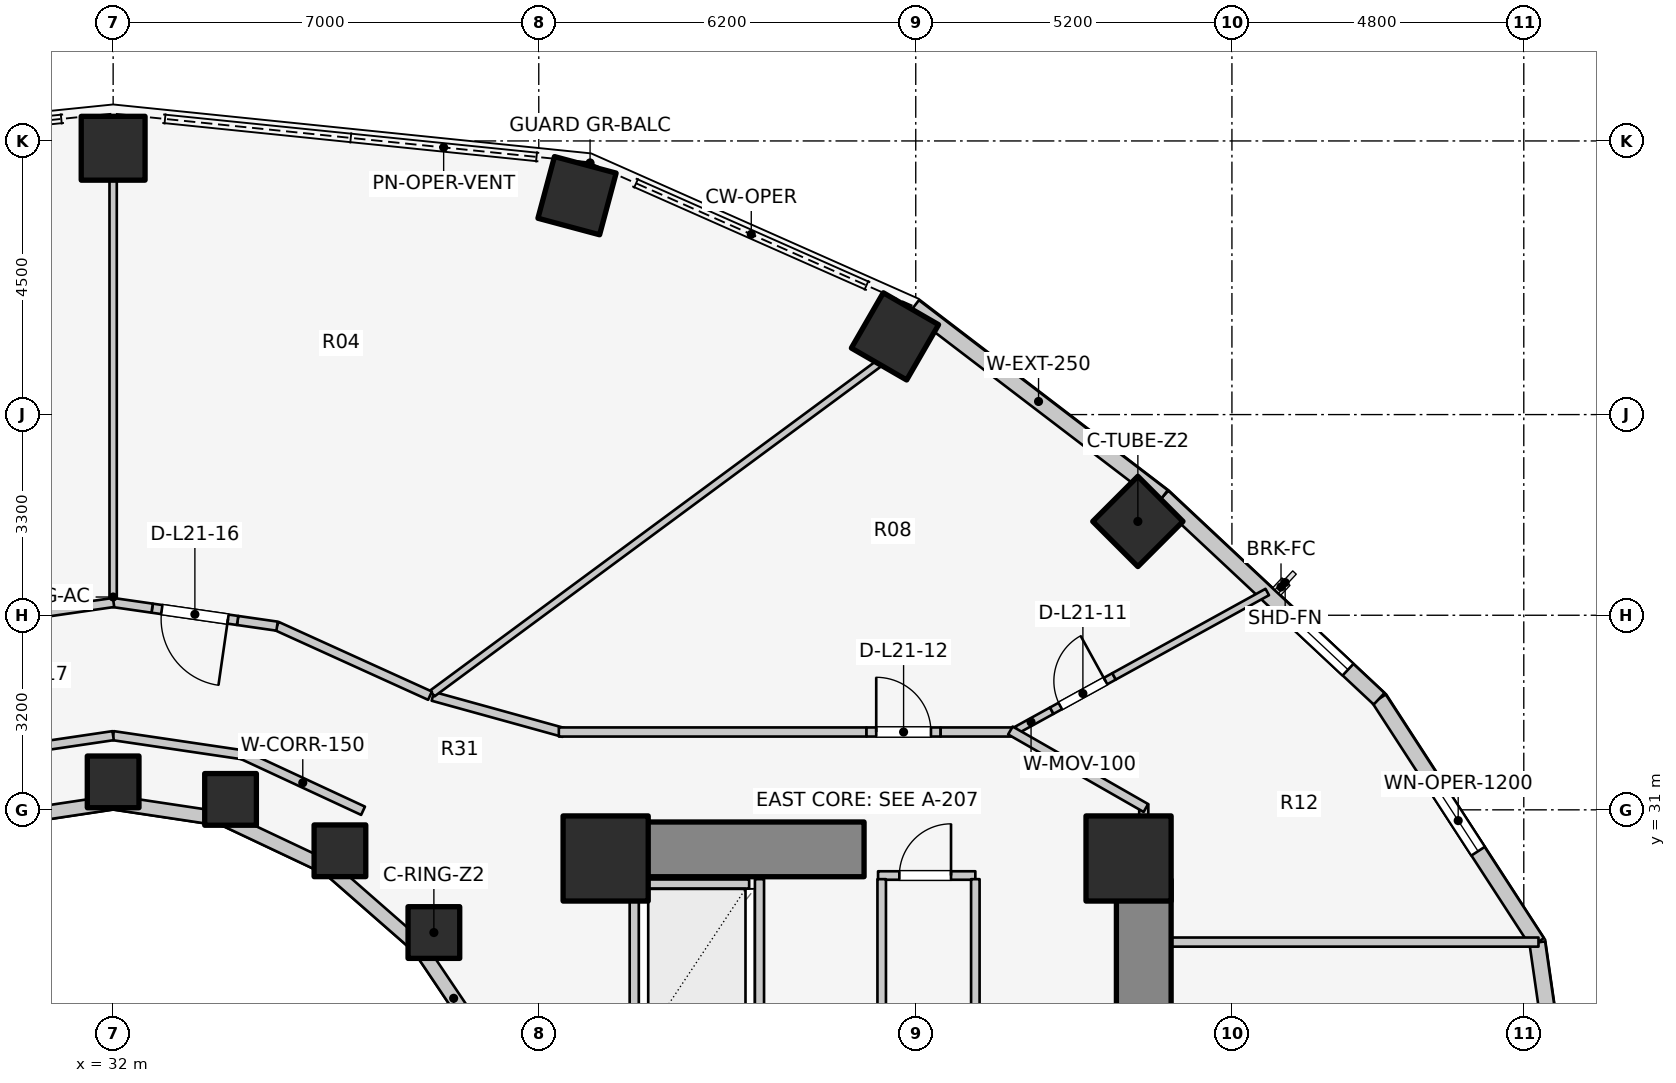
"""IFC4 building model, lengths in metres.
Left out: names, types, materials, properties, quantities, classifications, styles, units other than length and angle.
Written with IfcOpenShell. Run it as: python <this file> out.ifc"""

import sys

from ifc_helpers import new_model, si_unit, direction, frame, frame_2d, origin, origin_2d, place, context, subcontext, project, spatial, rectangle, extrude, element, fill, save


model = new_model("IFC4")
c1 = context("Model", 3, precision=1e-05, world=origin(), true_north=direction((0.0, 1.0)))
c2 = subcontext(c1, "Body", "Model", "MODEL_VIEW")
j1 = project(units=[si_unit("LENGTHUNIT", "METRE"), si_unit("PLANEANGLEUNIT", "RADIAN")], contexts=[c1])
p1 = place(None, origin())
s1 = spatial("IfcSite", under=j1, at=p1, CompositionType="ELEMENT")
p2 = place(p1, origin())
s2 = spatial("IfcBuilding", under=s1, at=p2, CompositionType="ELEMENT")
p3 = place(p2, frame((0.0, 0.0, 73.2)))
s3 = spatial("IfcBuildingStorey", under=s2, at=p3, CompositionType="ELEMENT", Elevation=73.2)
p4 = place(p3, frame((48.95, 17.05, 0.0), z_axis=(0.0, 0.0, 1.0), x_axis=(0.0, 1.0, 0.0)))
e1 = element("IfcWall", 1, at=p4, inside=s3, PredefinedType="SHEAR", context=c2, shape_type="SweptSolid", body=[
    extrude(rectangle(XDim=12.8, YDim=0.9, at=frame_2d((6.4, 0.0))), origin(), (0.0, 0.0, 1.0), 3.1),
])
p5 = place(p3, frame((39.85, 30.35, 0.0), z_axis=(0.0, 0.0, 1.0), x_axis=(1.0, 0.0, 0.0)))
e2 = element("IfcWall", 2, at=p5, inside=s3, PredefinedType="SHEAR", context=c2, shape_type="SweptSolid", body=[
    extrude(rectangle(XDim=4.5, YDim=0.9, at=frame_2d((2.25, 0.0))), origin(), (0.0, 0.0, 1.0), 3.1),
])
for number, where, z_axis, x_axis in (
    (3, (48.7, 30.2, 0.0), (0.0, 0.0, 1.0), (1.0, 0.0, 0.0)),
    (4, (40.1, 30.2, 0.0), (0.0, 0.0, 1.0), (1.0, 0.0, 0.0)),
):
    element("IfcColumn", number, at=place(p3, frame(where, z_axis=z_axis, x_axis=x_axis)), inside=s3, PredefinedType="COLUMN", context=c2, shape_type="SweptSolid", body=[
        extrude(rectangle(XDim=1.4, YDim=1.4, at=origin_2d()), origin(), (0.0, 0.0, 1.0), 3.1),
    ])
p6 = place(p3, frame((37.275, 28.982, 0.0), z_axis=(0.0, 0.0, 1.0), x_axis=(1.0, 0.0, 0.0)))
e5 = element("IfcColumn", 5, at=p6, inside=s3, PredefinedType="COLUMN", context=c2, shape_type="SweptSolid", body=[
    extrude(rectangle(XDim=0.85, YDim=0.85, at=origin_2d()), origin(), (0.0, 0.0, 1.0), 3.1),
])
p7 = place(p3, frame((48.853, 35.743, 0.0), z_axis=(0.0, 0.0, 1.0), x_axis=(0.707106781187, 0.707106781187, 0.0)))
e6 = element("IfcColumn", 6, at=p7, inside=s3, PredefinedType="COLUMN", context=c2, shape_type="SweptSolid", body=[
    extrude(rectangle(XDim=1.05, YDim=1.05, at=origin_2d()), origin(), (0.0, 0.0, 1.0), 3.1),
])
p8 = place(p3, frame((35.73, 30.327, 0.0), z_axis=(0.0, 0.0, 1.0), x_axis=(1.0, 0.0, 0.0)))
e7 = element("IfcColumn", 7, at=p8, inside=s3, PredefinedType="COLUMN", context=c2, shape_type="SweptSolid", body=[
    extrude(rectangle(XDim=0.85, YDim=0.85, at=origin_2d()), origin(), (0.0, 0.0, 1.0), 3.1),
])
p9 = place(p3, frame((44.858, 38.786, 0.0), z_axis=(0.0, 0.0, 1.0), x_axis=(0.5, 0.866025403784, 0.0)))
e8 = element("IfcColumn", 8, at=p9, inside=s3, PredefinedType="COLUMN", context=c2, shape_type="SweptSolid", body=[
    extrude(rectangle(XDim=1.05, YDim=1.05, at=origin_2d()), origin(), (0.0, 0.0, 1.0), 3.1),
])
p10 = place(p3, frame((33.931, 31.172, 0.0), z_axis=(0.0, 0.0, 1.0), x_axis=(1.0, 0.0, 0.0)))
e9 = element("IfcColumn", 9, at=p10, inside=s3, PredefinedType="COLUMN", context=c2, shape_type="SweptSolid", body=[
    extrude(rectangle(XDim=0.85, YDim=0.85, at=origin_2d()), origin(), (0.0, 0.0, 1.0), 3.1),
])
p11 = place(p3, frame((39.629, 41.1, 0.0), z_axis=(0.0, 0.0, 1.0), x_axis=(0.258819045103, 0.965925826289, 0.0)))
e10 = element("IfcColumn", 10, at=p11, inside=s3, PredefinedType="COLUMN", context=c2, shape_type="SweptSolid", body=[
    extrude(rectangle(XDim=1.05, YDim=1.05, at=origin_2d()), origin(), (0.0, 0.0, 1.0), 3.1),
])
p12 = place(p3, frame((32.0, 31.46, 0.0), z_axis=(0.0, 0.0, 1.0), x_axis=(1.0, 0.0, 0.0)))
e11 = element("IfcColumn", 11, at=p12, inside=s3, PredefinedType="COLUMN", context=c2, shape_type="SweptSolid", body=[
    extrude(rectangle(XDim=0.85, YDim=0.85, at=origin_2d()), origin(), (0.0, 0.0, 1.0), 3.1),
])
p13 = place(p3, frame((32.0, 41.88, 0.0), z_axis=(0.0, 0.0, 1.0), x_axis=(0.0, 1.0, 0.0)))
e12 = element("IfcColumn", 12, at=p13, inside=s3, PredefinedType="COLUMN", context=c2, shape_type="SweptSolid", body=[
    extrude(rectangle(XDim=1.05, YDim=1.05, at=origin_2d()), origin(), (0.0, 0.0, 1.0), 3.1),
])
p14 = place(p3, frame((38.166, 27.06, 0.0), z_axis=(0.0, 0.0, 1.0), x_axis=(-0.558197800898, 0.829707909492, 0.0)))
e13 = element("IfcWall", 13, at=p14, inside=s3, PredefinedType="STANDARD", context=c2, shape_type="SweptSolid", body=[
    extrude(rectangle(XDim=2.027, YDim=0.23, at=frame_2d((1.013, 0.0))), origin(), (0.0, 0.0, 1.0), 1.22),
])
p15 = place(p3, frame((37.035, 28.742, 0.0), z_axis=(0.0, 0.0, 1.0), x_axis=(-0.752576694707, 0.658504607869, 0.0)))
e14 = element("IfcWall", 14, at=p15, inside=s3, PredefinedType="STANDARD", context=c2, shape_type="SweptSolid", body=[
    extrude(rectangle(XDim=1.959, YDim=0.23, at=frame_2d((0.98, 0.0))), origin(), (0.0, 0.0, 1.0), 1.22),
])
p16 = place(p3, frame((35.56, 30.032, 0.0), z_axis=(0.0, 0.0, 1.0), x_axis=(-0.904179699603, 0.427152280606, 0.0)))
e15 = element("IfcWall", 15, at=p16, inside=s3, PredefinedType="STANDARD", context=c2, shape_type="SweptSolid", body=[
    extrude(rectangle(XDim=1.899, YDim=0.23, at=frame_2d((0.95, 0.0))), origin(), (0.0, 0.0, 1.0), 1.22),
])
for number, where, z_axis, x_axis in (
    (16, (33.843, 30.843, 0.0), (0.0, 0.0, 1.0), (-0.989, 0.149, 0.0)),
    (17, (32.0, 31.12, 0.0), (0.0, 0.0, 1.0), (-0.989, -0.149, 0.0)),
):
    element("IfcWall", number, at=place(p3, frame(where, z_axis=z_axis, x_axis=x_axis)), inside=s3, PredefinedType="STANDARD", context=c2, shape_type="SweptSolid", body=[
        extrude(rectangle(XDim=1.864, YDim=0.23, at=frame_2d((0.932, 0.0))), origin(), (0.0, 0.0, 1.0), 1.22),
    ])
p17 = place(p3, frame((56.26, 23.0, 0.0), z_axis=(0.0, 0.0, 1.0), x_axis=(-0.142572472068, 0.98978436551, 0.0)))
e18 = element("IfcWall", 18, at=p17, inside=s3, PredefinedType="STANDARD", context=c2, shape_type="SweptSolid", body=[
    extrude(rectangle(XDim=5.879, YDim=0.26, at=frame_2d((2.939, 0.0))), origin(), (0.0, 0.0, 1.0), 2.57),
])
p18 = place(p17, frame((2.189, 0.0, 0.75)))
e19 = element("IfcOpeningElement", 19, at=p18, cuts=e18, PredefinedType="OPENING", context=c2, shape_type="SweptSolid", body=[
    extrude(rectangle(XDim=1.5, YDim=1.6, at=frame_2d((0.75, 0.8))), frame((0.0, 0.14, 0.0), z_axis=(0.0, -1.0, 0.0), x_axis=(1.0, 0.0, 0.0)), (0.0, 0.0, 1.0), 0.28),
])
p19 = place(p3, frame((55.422, 28.819, 0.0), z_axis=(0.0, 0.0, 1.0), x_axis=(-0.544388392991, 0.838833283541, 0.0)))
e20 = element("IfcWall", 20, at=p19, inside=s3, PredefinedType="STANDARD", context=c2, shape_type="SweptSolid", body=[
    extrude(rectangle(XDim=4.778, YDim=0.26, at=frame_2d((2.389, 0.0))), origin(), (0.0, 0.0, 1.0), 1.22),
])
p20 = place(p19, frame((1.789, 0.0, 0.15)))
e21 = element("IfcOpeningElement", 21, at=p20, cuts=e20, PredefinedType="OPENING", context=c2, shape_type="SweptSolid", body=[
    extrude(rectangle(XDim=1.2, YDim=0.9, at=frame_2d((0.6, 0.45))), frame((0.0, 0.14, 0.0), z_axis=(0.0, -1.0, 0.0), x_axis=(1.0, 0.0, 0.0)), (0.0, 0.0, 1.0), 0.28),
])
p21 = place(p3, frame((52.821, 32.827, 0.0), z_axis=(0.0, 0.0, 1.0), x_axis=(-0.730162452258, 0.68327358599, 0.0)))
e22 = element("IfcWall", 22, at=p21, inside=s3, PredefinedType="STANDARD", context=c2, shape_type="SweptSolid", body=[
    extrude(rectangle(XDim=4.868, YDim=0.26, at=frame_2d((2.434, 0.0))), origin(), (0.0, 0.0, 1.0), 1.22),
])
p22 = place(p21, frame((0.7, 0.0, 0.15)))
e23 = element("IfcOpeningElement", 23, at=p22, cuts=e22, PredefinedType="OPENING", context=c2, shape_type="SweptSolid", body=[
    extrude(rectangle(XDim=1.2, YDim=0.9, at=frame_2d((0.6, 0.45))), frame((0.0, 0.14, 0.0), z_axis=(0.0, -1.0, 0.0), x_axis=(1.0, 0.0, 0.0)), (0.0, 0.0, 1.0), 0.28),
])
p23 = place(p3, frame((49.266, 36.153, 0.0), z_axis=(0.0, 0.0, 1.0), x_axis=(-0.794809810864, 0.606858603427, 0.0)))
e24 = element("IfcWall", 24, at=p23, inside=s3, PredefinedType="STANDARD", context=c2, shape_type="SweptSolid", body=[
    extrude(rectangle(XDim=5.149, YDim=0.26, at=frame_2d((2.575, 0.0))), origin(), (0.0, 0.0, 1.0), 1.22),
])
p24 = place(p3, frame((40.74, 29.78, 0.0), z_axis=(0.0, 0.0, 1.0), x_axis=(1.0, 0.0, 0.0)))
e25 = element("IfcWall", 25, at=p24, inside=s3, PredefinedType="SOLIDWALL", context=c2, shape_type="SweptSolid", body=[
    extrude(rectangle(XDim=1.72, YDim=0.15, at=frame_2d((0.86, 0.0))), origin(), (0.0, 0.0, 1.0), 2.575),
])
for number, where, z_axis, x_axis in (
    (26, (40.57, 27.14, 0.0), (0.0, 0.0, 1.0), (0.0, 1.0, 0.0)),
    (27, (42.63, 27.14, 0.0), (0.0, 0.0, 1.0), (0.0, 1.0, 0.0)),
):
    element("IfcWall", number, at=place(p3, frame(where, z_axis=z_axis, x_axis=x_axis)), inside=s3, PredefinedType="SOLIDWALL", context=c2, shape_type="SweptSolid", body=[
        extrude(rectangle(XDim=2.72, YDim=0.15, at=frame_2d((1.36, 0.0))), origin(), (0.0, 0.0, 1.0), 2.575),
    ])
p25 = place(p3, frame((44.58, 29.92, 0.0), z_axis=(0.0, 0.0, 1.0), x_axis=(1.0, 0.0, 0.0)))
e28 = element("IfcWall", 28, at=p25, inside=s3, PredefinedType="PLUMBINGWALL", context=c2, shape_type="SweptSolid", body=[
    extrude(rectangle(XDim=1.6, YDim=0.14, at=frame_2d((0.8, 0.0))), origin(), (0.0, 0.0, 1.0), 2.575),
])
p26 = place(p25, frame((0.35, 0.0, 0.0)))
e29 = element("IfcOpeningElement", 29, at=p26, cuts=e28, PredefinedType="OPENING", context=c2, shape_type="SweptSolid", body=[
    extrude(rectangle(XDim=0.85, YDim=2.05, at=frame_2d((0.425, 1.025))), frame((0.0, 0.08, 0.0), z_axis=(0.0, -1.0, 0.0), x_axis=(1.0, 0.0, 0.0)), (0.0, 0.0, 1.0), 0.16),
])
for number, where, z_axis, x_axis in (
    (30, (44.64, 25.98, 0.0), (0.0, 0.0, 1.0), (0.0, 1.0, 0.0)),
    (31, (46.18, 25.98, 0.0), (0.0, 0.0, 1.0), (0.0, 1.0, 0.0)),
):
    element("IfcWall", number, at=place(p3, frame(where, z_axis=z_axis, x_axis=x_axis)), inside=s3, PredefinedType="PLUMBINGWALL", context=c2, shape_type="SweptSolid", body=[
        extrude(rectangle(XDim=3.88, YDim=0.14, at=frame_2d((1.94, 0.0))), origin(), (0.0, 0.0, 1.0), 2.575),
    ])
p27 = place(p3, frame((36.11, 30.985, 0.0), z_axis=(0.0, 0.0, 1.0), x_axis=(-0.906943449489, 0.421252393975, 0.0)))
e32 = element("IfcWall", 32, at=p27, inside=s3, PredefinedType="PARTITIONING", context=c2, shape_type="SweptSolid", body=[
    extrude(rectangle(XDim=2.186, YDim=0.15, at=frame_2d((1.093, 0.0))), origin(), (0.0, 0.0, 1.0), 1.992),
])
for number, where, z_axis, x_axis in (
    (33, (34.127, 31.906, 0.0), (0.0, 0.0, 1.0), (-0.989, 0.146, 0.0)),
    (34, (32.0, 32.22, 0.0), (0.0, 0.0, 1.0), (-0.989, -0.146, 0.0)),
):
    element("IfcWall", number, at=place(p3, frame(where, z_axis=z_axis, x_axis=x_axis)), inside=s3, PredefinedType="PARTITIONING", context=c2, shape_type="SweptSolid", body=[
        extrude(rectangle(XDim=2.151, YDim=0.15, at=frame_2d((1.075, 0.0))), origin(), (0.0, 0.0, 1.0), 1.992),
    ])
p28 = place(p3, frame((48.95, 28.825, 0.0), z_axis=(0.0, 0.0, 1.0), x_axis=(1.0, 0.0, 0.0)))
e35 = element("IfcWall", 35, at=p28, inside=s3, PredefinedType="PARTITIONING", context=c2, shape_type="SweptSolid", body=[
    extrude(rectangle(XDim=6.492, YDim=0.15, at=frame_2d((3.246, 0.0))), origin(), (0.0, 0.0, 1.0), 2.575),
])
p29 = place(p3, frame((48.95, 29.8, 0.0), z_axis=(0.0, 0.0, 1.0), x_axis=(0.0, 1.0, 0.0)))
e36 = element("IfcWall", 36, at=p29, inside=s3, PredefinedType="PARTITIONING", context=c2, shape_type="SweptSolid", body=[
    extrude(rectangle(XDim=1.29, YDim=0.15, at=frame_2d((0.645, 0.0))), origin(), (0.0, 0.0, 1.0), 1.22),
])
p30 = place(p3, frame((46.756, 32.256, 0.0), z_axis=(0.0, 0.0, 1.0), x_axis=(0.875930419429, 0.482437457418, 0.0)))
e37 = element("IfcWall", 37, at=p30, inside=s3, PredefinedType="MOVABLE", context=c2, shape_type="SweptSolid", body=[
    extrude(rectangle(XDim=0.777, YDim=0.12, at=frame_2d((0.388, 0.0))), origin(), (0.0, 0.0, 1.0), 2.575),
])
p31 = place(p3, frame((47.437, 32.631, 0.0), z_axis=(0.0, 0.0, 1.0), x_axis=(0.876030797447, 0.482255162673, 0.0)))
e38 = element("IfcWall", 38, at=p31, inside=s3, PredefinedType="MOVABLE", context=c2, shape_type="SweptSolid", body=[
    extrude(rectangle(XDim=1.17, YDim=0.12, at=frame_2d((0.585, 0.0))), origin(), (0.0, 0.0, 1.0), 2.11),
])
p32 = place(p31, frame((0.16, 0.0, 0.0)))
e39 = element("IfcOpeningElement", 39, at=p32, cuts=e38, PredefinedType="OPENING", context=c2, shape_type="SweptSolid", body=[
    extrude(rectangle(XDim=0.85, YDim=2.05, at=frame_2d((0.425, 1.025))), frame((0.0, 0.07, 0.0), z_axis=(0.0, -1.0, 0.0), x_axis=(1.0, 0.0, 0.0)), (0.0, 0.0, 1.0), 0.14),
])
p33 = place(p3, frame((48.461, 33.195, 0.0), z_axis=(0.0, 0.0, 1.0), x_axis=(0.876000760759, 0.482309721185, 0.0)))
e40 = element("IfcWall", 40, at=p33, inside=s3, PredefinedType="MOVABLE", context=c2, shape_type="SweptSolid", body=[
    extrude(rectangle(XDim=2.876, YDim=0.12, at=frame_2d((1.438, 0.0))), origin(), (0.0, 0.0, 1.0), 1.22),
])
p34 = place(p3, frame((37.258, 32.867, 0.0), z_axis=(0.0, 0.0, 1.0), x_axis=(0.963833843713, -0.266503886865, 0.0)))
e41 = element("IfcWall", 41, at=p34, inside=s3, PredefinedType="PARTITIONING", context=c2, shape_type="SweptSolid", body=[
    extrude(rectangle(XDim=2.232, YDim=0.15, at=frame_2d((1.116, 0.0))), origin(), (0.0, 0.0, 1.0), 1.992),
])
p35 = place(p3, frame((39.33, 32.28, 0.0), z_axis=(0.0, 0.0, 1.0), x_axis=(1.0, 0.0, 0.0)))
e42 = element("IfcWall", 42, at=p35, inside=s3, PredefinedType="PARTITIONING", context=c2, shape_type="SweptSolid", body=[
    extrude(rectangle(XDim=5.06, YDim=0.15, at=frame_2d((2.53, 0.0))), origin(), (0.0, 0.0, 1.0), 1.992),
])
p36 = place(p3, frame((44.39, 32.28, 0.0), z_axis=(0.0, 0.0, 1.0), x_axis=(1.0, 0.0, 0.0)))
e43 = element("IfcWall", 43, at=p36, inside=s3, PredefinedType="PARTITIONING", context=c2, shape_type="SweptSolid", body=[
    extrude(rectangle(XDim=1.22, YDim=0.15, at=frame_2d((0.61, 0.0))), origin(), (0.0, 0.0, 1.0), 2.575),
])
p37 = place(p36, frame((0.16, 0.0, 0.0)))
e44 = element("IfcOpeningElement", 44, at=p37, cuts=e43, PredefinedType="OPENING", context=c2, shape_type="SweptSolid", body=[
    extrude(rectangle(XDim=0.9, YDim=2.1, at=frame_2d((0.45, 1.05))), frame((0.0, 0.085, 0.0), z_axis=(0.0, -1.0, 0.0), x_axis=(1.0, 0.0, 0.0)), (0.0, 0.0, 1.0), 0.17),
])
p38 = place(p3, frame((45.61, 32.28, 0.0), z_axis=(0.0, 0.0, 1.0), x_axis=(1.0, 0.0, 0.0)))
e45 = element("IfcWall", 45, at=p38, inside=s3, PredefinedType="PARTITIONING", context=c2, shape_type="SweptSolid", body=[
    extrude(rectangle(XDim=1.24, YDim=0.15, at=frame_2d((0.62, 0.0))), origin(), (0.0, 0.0, 1.0), 2.575),
])
p39 = place(p3, frame((46.757, 32.305, 0.0), z_axis=(0.0, 0.0, 1.0), x_axis=(0.867991349648, -0.496579315857, 0.0)))
e46 = element("IfcWall", 46, at=p39, inside=s3, PredefinedType="PARTITIONING", context=c2, shape_type="SweptSolid", body=[
    extrude(rectangle(XDim=2.567, YDim=0.15, at=frame_2d((1.283, 0.0))), origin(), (0.0, 0.0, 1.0), 1.22),
])
p40 = place(p3, frame((37.249, 32.914, 0.0), z_axis=(0.0, 0.0, 1.0), x_axis=(0.80430981394, 0.594210167533, 0.0)))
e47 = element("IfcWall", 47, at=p40, inside=s3, PredefinedType="MOVABLE", context=c2, shape_type="SweptSolid", body=[
    extrude(rectangle(XDim=9.146, YDim=0.12, at=frame_2d((4.573, 0.0))), origin(), (0.0, 0.0, 1.0), 1.22),
])
p41 = place(p3, frame((32.0, 34.465, 0.0), z_axis=(0.0, 0.0, 1.0), x_axis=(0.0, 1.0, 0.0)))
e48 = element("IfcWall", 48, at=p41, inside=s3, PredefinedType="MOVABLE", context=c2, shape_type="SweptSolid", body=[
    extrude(rectangle(XDim=6.91, YDim=0.12, at=frame_2d((3.455, 0.0))), origin(), (0.0, 0.0, 1.0), 1.22),
])
p42 = place(p3, frame((37.211, 32.877, 0.0), z_axis=(0.0, 0.0, 1.0), x_axis=(-0.910435980343, 0.413650003865, 0.0)))
e49 = element("IfcWall", 49, at=p42, inside=s3, PredefinedType="PARTITIONING", context=c2, shape_type="SweptSolid", body=[
    extrude(rectangle(XDim=2.766, YDim=0.15, at=frame_2d((1.383, 0.0))), origin(), (0.0, 0.0, 1.0), 1.992),
])
p43 = place(p3, frame((34.696, 34.021, 0.0), z_axis=(0.0, 0.0, 1.0), x_axis=(-0.989829975321, 0.142255474256, 0.0)))
e50 = element("IfcWall", 50, at=p43, inside=s3, PredefinedType="PARTITIONING", context=c2, shape_type="SweptSolid", body=[
    extrude(rectangle(XDim=0.656, YDim=0.15, at=frame_2d((0.328, 0.0))), origin(), (0.0, 0.0, 1.0), 2.575),
])
p44 = place(p3, frame((34.047, 34.114, 0.0), z_axis=(0.0, 0.0, 1.0), x_axis=(-0.98979070052, 0.142528485449, 0.0)))
e51 = element("IfcWall", 51, at=p44, inside=s3, PredefinedType="PARTITIONING", context=c2, shape_type="SweptSolid", body=[
    extrude(rectangle(XDim=1.42, YDim=0.15, at=frame_2d((0.71, 0.0))), origin(), (0.0, 0.0, 1.0), 2.575),
])
p45 = place(p44, frame((0.16, 0.0, 0.0)))
e52 = element("IfcOpeningElement", 52, at=p45, cuts=e51, PredefinedType="OPENING", context=c2, shape_type="SweptSolid", body=[
    extrude(rectangle(XDim=1.1, YDim=2.1, at=frame_2d((0.55, 1.05))), frame((0.0, 0.085, 0.0), z_axis=(0.0, -1.0, 0.0), x_axis=(1.0, 0.0, 0.0)), (0.0, 0.0, 1.0), 0.17),
])
p46 = place(p3, frame((32.642, 34.316, 0.0), z_axis=(0.0, 0.0, 1.0), x_axis=(-0.989777474181, 0.142620305723, 0.0)))
e53 = element("IfcWall", 53, at=p46, inside=s3, PredefinedType="PARTITIONING", context=c2, shape_type="SweptSolid", body=[
    extrude(rectangle(XDim=0.656, YDim=0.15, at=frame_2d((0.328, 0.0))), origin(), (0.0, 0.0, 1.0), 1.992),
])
p47 = place(p3, frame((32.007, 34.41, 0.0), z_axis=(0.0, 0.0, 1.0), x_axis=(-0.989796962007, -0.142484995705, 0.0)))
e54 = element("IfcWall", 54, at=p47, inside=s3, PredefinedType="PARTITIONING", context=c2, shape_type="SweptSolid", body=[
    extrude(rectangle(XDim=2.731, YDim=0.15, at=frame_2d((1.366, 0.0))), origin(), (0.0, 0.0, 1.0), 1.992),
])
p48 = place(p20, origin())
e55 = element("IfcWindow", 55, at=p48, inside=s3, PartitioningType="SINGLE_PANEL", PredefinedType="WINDOW", context=c2, shape_type="SweptSolid", body=[
    extrude(rectangle(XDim=1.2, YDim=0.9, at=frame_2d((0.6, 0.45))), frame((0.0, 0.03, 0.0), z_axis=(0.0, -1.0, 0.0), x_axis=(1.0, 0.0, 0.0)), (0.0, 0.0, 1.0), 0.06),
])
fill(e21, e55)
p49 = place(p22, origin())
e56 = element("IfcWindow", 56, at=p49, inside=s3, PartitioningType="SINGLE_PANEL", PredefinedType="WINDOW", context=c2, shape_type="SweptSolid", body=[
    extrude(rectangle(XDim=1.2, YDim=0.9, at=frame_2d((0.6, 0.45))), frame((0.0, 0.03, 0.0), z_axis=(0.0, -1.0, 0.0), x_axis=(1.0, 0.0, 0.0)), (0.0, 0.0, 1.0), 0.06),
])
fill(e23, e56)
p50 = place(p26, origin())
e57 = element("IfcDoor", 57, at=p50, inside=s3, OperationType="SINGLE_SWING_RIGHT", PredefinedType="DOOR", context=c2, shape_type="SweptSolid", body=[
    extrude(rectangle(XDim=0.85, YDim=2.05, at=frame_2d((0.425, 1.025))), frame((0.0, 0.025, 0.0), z_axis=(0.0, -1.0, 0.0), x_axis=(1.0, 0.0, 0.0)), (0.0, 0.0, 1.0), 0.05),
])
fill(e29, e57)
p51 = place(p32, origin())
e58 = element("IfcDoor", 58, at=p51, inside=s3, OperationType="SINGLE_SWING_RIGHT", PredefinedType="DOOR", context=c2, shape_type="SweptSolid", body=[
    extrude(rectangle(XDim=0.85, YDim=2.05, at=frame_2d((0.425, 1.025))), frame((0.0, 0.025, 0.0), z_axis=(0.0, -1.0, 0.0), x_axis=(1.0, 0.0, 0.0)), (0.0, 0.0, 1.0), 0.05),
])
fill(e39, e58)
p52 = place(p37, origin())
e59 = element("IfcDoor", 59, at=p52, inside=s3, OperationType="SINGLE_SWING_LEFT", PredefinedType="DOOR", context=c2, shape_type="SweptSolid", body=[
    extrude(rectangle(XDim=0.9, YDim=2.1, at=frame_2d((0.45, 1.05))), frame((0.0, 0.025, 0.0), z_axis=(0.0, -1.0, 0.0), x_axis=(1.0, 0.0, 0.0)), (0.0, 0.0, 1.0), 0.05),
])
fill(e44, e59)
p53 = place(p45, origin())
e60 = element("IfcDoor", 60, at=p53, inside=s3, OperationType="SINGLE_SWING_LEFT", PredefinedType="DOOR", context=c2, shape_type="SweptSolid", body=[
    extrude(rectangle(XDim=1.1, YDim=2.1, at=frame_2d((0.55, 1.05))), frame((0.0, 0.025, 0.0), z_axis=(0.0, -1.0, 0.0), x_axis=(1.0, 0.0, 0.0)), (0.0, 0.0, 1.0), 0.05),
])
fill(e52, e60)
save(model, sys.argv[1])
